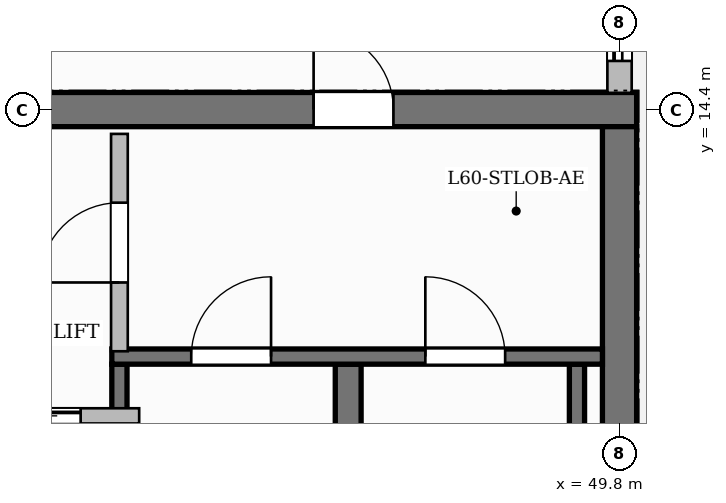
"""IFC4 building model, lengths in metres.
Left out: names, types, materials, properties, quantities, classifications, styles, units other than length and angle.
Written with IfcOpenShell. Run it as: python <this file> out.ifc"""

import sys

from ifc_helpers import new_model, si_unit, direction, frame, frame_2d, origin, place, context, subcontext, project, spatial, rectangle, extrude, source, transform, mapped, element, fill, save


model = new_model("IFC4")
c1 = context("Model", 3, precision=1e-05, world=origin(), true_north=direction((0.0, 1.0)))
c2 = subcontext(c1, "Body", "Model", "MODEL_VIEW")
j1 = project(units=[si_unit("LENGTHUNIT", "METRE"), si_unit("PLANEANGLEUNIT", "RADIAN")], contexts=[c1])
p1 = place(None, origin())
s1 = spatial("IfcSite", under=j1, at=p1, CompositionType="ELEMENT")
p2 = place(p1, origin())
s2 = spatial("IfcBuilding", under=s1, at=p2, CompositionType="ELEMENT")
p3 = place(p2, frame((0.0, 0.0, 240.4)))
s3 = spatial("IfcBuildingStorey", under=s2, at=p3, CompositionType="ELEMENT", Elevation=240.4)
p4 = place(p3, frame((34.575, 14.4, 0.0), z_axis=(0.0, 0.0, 1.0), x_axis=(1.0, 0.0, 0.0)))
e1 = element("IfcWall", 1, at=p4, inside=s3, PredefinedType="SHEAR", context=c2, shape_type="SweptSolid", body=[
    extrude(rectangle(XDim=15.45, YDim=0.45, at=frame_2d((7.725, 0.0))), origin(), (0.0, 0.0, 1.0), 3.85),
])
p5 = place(p4, frame((5.355, 0.0, 0.0)))
e2 = element("IfcOpeningElement", 2, at=p5, cuts=e1, PredefinedType="OPENING", context=c2, shape_type="SweptSolid", body=[
    extrude(rectangle(XDim=1.5, YDim=2.2, at=frame_2d((0.75, 1.1))), frame((0.0, 0.235, 0.0), z_axis=(0.0, -1.0, 0.0), x_axis=(1.0, 0.0, 0.0)), (0.0, 0.0, 1.0), 0.47),
])
p6 = place(p4, frame((1.57, 0.0, 0.0)))
e3 = element("IfcOpeningElement", 3, at=p6, cuts=e1, PredefinedType="OPENING", context=c2, shape_type="SweptSolid", body=[
    extrude(rectangle(XDim=1.05, YDim=2.15, at=frame_2d((0.525, 1.075))), frame((0.0, 0.235, 0.0), z_axis=(0.0, -1.0, 0.0), x_axis=(1.0, 0.0, 0.0)), (0.0, 0.0, 1.0), 0.47),
])
p7 = place(p4, frame((11.2, 0.0, 0.0)))
e4 = element("IfcOpeningElement", 4, at=p7, cuts=e1, PredefinedType="OPENING", context=c2, shape_type="SweptSolid", body=[
    extrude(rectangle(XDim=1.05, YDim=2.15, at=frame_2d((0.525, 1.075))), frame((0.0, 0.235, 0.0), z_axis=(0.0, -1.0, 0.0), x_axis=(1.0, 0.0, 0.0)), (0.0, 0.0, 1.0), 0.47),
])
p8 = place(p3, frame((49.8, 3.825, 0.0), z_axis=(0.0, 0.0, 1.0), x_axis=(0.0, 1.0, 0.0)))
e5 = element("IfcWall", 5, at=p8, inside=s3, PredefinedType="SHEAR", context=c2, shape_type="SweptSolid", body=[
    extrude(rectangle(XDim=10.35, YDim=0.45, at=frame_2d((5.175, 0.0))), origin(), (0.0, 0.0, 1.0), 3.85),
])
p9 = place(p3, frame((43.22, 4.1, 0.0), z_axis=(0.0, 0.0, 1.0), x_axis=(0.0, 1.0, 0.0)))
e6 = element("IfcWall", 6, at=p9, inside=s3, PredefinedType="SHEAR", context=c2, shape_type="SweptSolid", body=[
    extrude(rectangle(XDim=6.95, YDim=0.2, at=frame_2d((3.475, 0.0))), origin(), (0.0, 0.0, 1.0), 3.85),
])
p10 = place(p3, frame((46.23, 4.1, 0.0), z_axis=(0.0, 0.0, 1.0), x_axis=(0.0, 1.0, 0.0)))
e7 = element("IfcWall", 7, at=p10, inside=s3, PredefinedType="SHEAR", context=c2, shape_type="SweptSolid", body=[
    extrude(rectangle(XDim=6.95, YDim=0.34, at=frame_2d((3.475, 0.0))), origin(), (0.0, 0.0, 1.0), 3.85),
])
p11 = place(p3, frame((49.24, 4.1, 0.0), z_axis=(0.0, 0.0, 1.0), x_axis=(0.0, 1.0, 0.0)))
e8 = element("IfcWall", 8, at=p11, inside=s3, PredefinedType="SHEAR", context=c2, shape_type="SweptSolid", body=[
    extrude(rectangle(XDim=6.95, YDim=0.2, at=frame_2d((3.475, 0.0))), origin(), (0.0, 0.0, 1.0), 3.85),
])
p12 = place(p3, frame((43.12, 11.15, 0.0), z_axis=(0.0, 0.0, 1.0), x_axis=(1.0, 0.0, 0.0)))
e9 = element("IfcWall", 9, at=p12, inside=s3, PredefinedType="SHEAR", context=c2, shape_type="SweptSolid", body=[
    extrude(rectangle(XDim=6.455, YDim=0.2, at=frame_2d((3.228, 0.0))), origin(), (0.0, 0.0, 1.0), 3.85),
])
p13 = place(p12, frame((1.045, 0.0, 0.0)))
e10 = element("IfcOpeningElement", 10, at=p13, cuts=e9, PredefinedType="OPENING", context=c2, shape_type="SweptSolid", body=[
    extrude(rectangle(XDim=1.05, YDim=2.2, at=frame_2d((0.525, 1.1))), frame((0.0, 0.11, 0.0), z_axis=(0.0, -1.0, 0.0), x_axis=(1.0, 0.0, 0.0)), (0.0, 0.0, 1.0), 0.22),
])
p14 = place(p12, frame((4.125, 0.0, 0.0)))
e11 = element("IfcOpeningElement", 11, at=p14, cuts=e9, PredefinedType="OPENING", context=c2, shape_type="SweptSolid", body=[
    extrude(rectangle(XDim=1.05, YDim=2.2, at=frame_2d((0.525, 1.1))), frame((0.0, 0.11, 0.0), z_axis=(0.0, -1.0, 0.0), x_axis=(1.0, 0.0, 0.0)), (0.0, 0.0, 1.0), 0.22),
])
p15 = place(p3, frame((43.22, 11.22, 0.0), z_axis=(0.0, 0.0, 1.0), x_axis=(0.0, 1.0, 0.0)))
e12 = element("IfcWall", 12, at=p15, inside=s3, PredefinedType="PARTITIONING", context=c2, shape_type="SweptSolid", body=[
    extrude(rectangle(XDim=2.86, YDim=0.22, at=frame_2d((1.43, 0.0))), origin(), (0.0, 0.0, 1.0), 3.6),
])
p16 = place(p15, frame((0.905, 0.0, 0.0)))
e13 = element("IfcOpeningElement", 13, at=p16, cuts=e12, PredefinedType="OPENING", context=c2, shape_type="SweptSolid", body=[
    extrude(rectangle(XDim=1.05, YDim=2.15, at=frame_2d((0.525, 1.075))), frame((0.0, 0.12, 0.0), z_axis=(0.0, -1.0, 0.0), x_axis=(1.0, 0.0, 0.0)), (0.0, 0.0, 1.0), 0.24),
])
p17 = place(p3, frame((40.84, 10.37, 0.0), z_axis=(0.0, 0.0, 1.0), x_axis=(1.0, 0.0, 0.0)))
e14 = element("IfcWall", 14, at=p17, inside=s3, PredefinedType="PARTITIONING", context=c2, shape_type="SweptSolid", body=[
    extrude(rectangle(XDim=2.64, YDim=0.2, at=frame_2d((1.32, 0.0))), origin(), (0.0, 0.0, 1.0), 3.6),
])
p18 = place(p17, frame((0.77, 0.0, 0.0)))
e15 = element("IfcOpeningElement", 15, at=p18, cuts=e14, PredefinedType="OPENING", context=c2, shape_type="SweptSolid", body=[
    extrude(rectangle(XDim=1.1, YDim=2.2, at=frame_2d((0.55, 1.1))), frame((0.0, 0.11, 0.0), z_axis=(0.0, -1.0, 0.0), x_axis=(1.0, 0.0, 0.0)), (0.0, 0.0, 1.0), 0.22),
])
p19 = place(p3, frame((49.8, 14.62, 0.0), z_axis=(0.0, 0.0, 1.0), x_axis=(0.0, 1.0, 0.0)))
e16 = element("IfcWall", 16, at=p19, inside=s3, PredefinedType="SOLIDWALL", context=c2, shape_type="SweptSolid", body=[
    extrude(rectangle(XDim=6.93, YDim=0.32, at=frame_2d((3.465, 0.0))), origin(), (0.0, 0.0, 1.0), 3.135),
])
p20 = place(p19, frame((0.42, 0.0, 0.0)))
e17 = element("IfcOpeningElement", 17, at=p20, cuts=e16, PredefinedType="OPENING", context=c2, shape_type="SweptSolid", body=[
    extrude(rectangle(XDim=1.2, YDim=2.2, at=frame_2d((0.6, 1.1))), frame((0.0, 0.17, 0.0), z_axis=(0.0, -1.0, 0.0), x_axis=(1.0, 0.0, 0.0)), (0.0, 0.0, 1.0), 0.34),
])
p21 = place(p19, frame((3.659, 0.0, 0.8)))
e18 = element("IfcOpeningElement", 18, at=p21, cuts=e16, PredefinedType="OPENING", context=c2, shape_type="SweptSolid", body=[
    extrude(rectangle(XDim=1.8, YDim=1.85, at=frame_2d((0.9, 0.925))), frame((0.0, 0.17, 0.0), z_axis=(0.0, -1.0, 0.0), x_axis=(1.0, 0.0, 0.0)), (0.0, 0.0, 1.0), 0.34),
])
m1 = source(origin(), c2, "Body", "SweptSolid", [
    extrude(rectangle(XDim=1.05, YDim=2.2, at=frame_2d((0.525, 1.1))), frame((0.0, 0.025, 0.0), z_axis=(0.0, -1.0, 0.0), x_axis=(1.0, 0.0, 0.0)), (0.0, 0.0, 1.0), 0.05),
])
p22 = place(p13, origin())
e19 = element("IfcDoor", 19, at=p22, inside=s3, OperationType="SINGLE_SWING_RIGHT", PredefinedType="DOOR", context=c2, shape_type="MappedRepresentation", body=[
    mapped(m1, transform((0.0, 0.0, 0.0), scale=1.0)),
])
fill(e10, e19)
p23 = place(p14, origin())
e20 = element("IfcDoor", 20, at=p23, inside=s3, OperationType="SINGLE_SWING_LEFT", PredefinedType="DOOR", context=c2, shape_type="MappedRepresentation", body=[
    mapped(m1, transform((0.0, 0.0, 0.0), scale=1.0)),
])
fill(e11, e20)
m2 = source(origin(), c2, "Body", "SweptSolid", [
    extrude(rectangle(XDim=1.05, YDim=2.15, at=frame_2d((0.525, 1.075))), frame((0.0, 0.025, 0.0), z_axis=(0.0, -1.0, 0.0), x_axis=(1.0, 0.0, 0.0)), (0.0, 0.0, 1.0), 0.05),
])
p24 = place(p16, origin())
e21 = element("IfcDoor", 21, at=p24, inside=s3, OperationType="SINGLE_SWING_LEFT", PredefinedType="DOOR", context=c2, shape_type="MappedRepresentation", body=[
    mapped(m2, transform((0.0, 0.0, 0.0), scale=1.0)),
])
fill(e13, e21)
p25 = place(p7, origin())
e22 = element("IfcDoor", 22, at=p25, inside=s3, OperationType="SINGLE_SWING_LEFT", PredefinedType="DOOR", context=c2, shape_type="MappedRepresentation", body=[
    mapped(m2, transform((0.0, 0.0, 0.0), scale=1.0)),
])
fill(e4, e22)
m3 = source(origin(), c2, "Body", "SweptSolid", [
    extrude(rectangle(XDim=1.1, YDim=2.2, at=frame_2d((0.55, 1.1))), frame((0.0, 0.025, 0.0), z_axis=(0.0, -1.0, 0.0), x_axis=(1.0, 0.0, 0.0)), (0.0, 0.0, 1.0), 0.05),
])
p26 = place(p18, origin())
e23 = element("IfcDoor", 23, at=p26, inside=s3, OperationType="SLIDING_TO_LEFT", PredefinedType="DOOR", context=c2, shape_type="MappedRepresentation", body=[
    mapped(m3, transform((0.0, 0.0, 0.0), scale=1.0)),
])
fill(e15, e23)
m4 = source(origin(), c2, "Body", "SweptSolid", [
    extrude(rectangle(XDim=1.2, YDim=2.2, at=frame_2d((0.6, 1.1))), frame((0.0, 0.025, 0.0), z_axis=(0.0, -1.0, 0.0), x_axis=(1.0, 0.0, 0.0)), (0.0, 0.0, 1.0), 0.05),
])
p27 = place(p20, origin())
e24 = element("IfcDoor", 24, at=p27, inside=s3, OperationType="SLIDING_TO_LEFT", PredefinedType="DOOR", context=c2, shape_type="MappedRepresentation", body=[
    mapped(m4, transform((0.0, 0.0, 0.0), scale=1.0)),
])
fill(e17, e24)
save(model, sys.argv[1])
